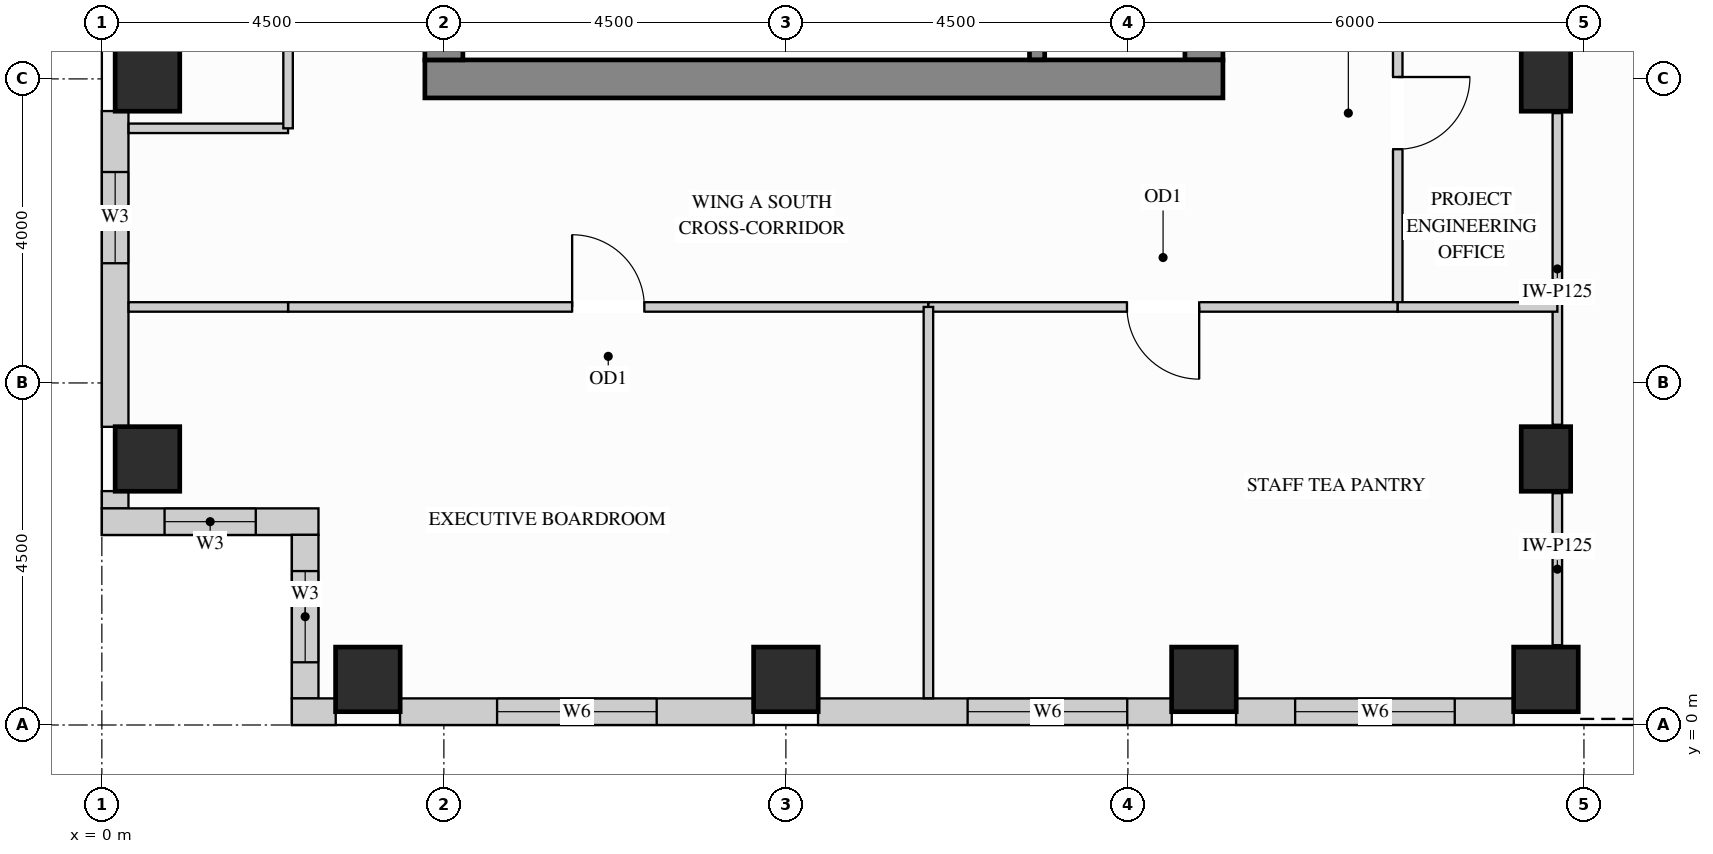
"""IFC4 building model, lengths in metres.
Left out: names, types, materials, properties, quantities, classifications, styles, units other than length and angle.
Written with IfcOpenShell. Run it as: python <this file> out.ifc"""

import sys

from ifc_helpers import new_model, si_unit, direction, frame, frame_2d, origin, origin_2d, place, context, subcontext, project, spatial, rectangle, extrude, source, transform, mapped, element, fill, save


model = new_model("IFC4")
c1 = context("Model", 3, precision=1e-05, world=origin(), true_north=direction((0.0, 1.0)))
c2 = subcontext(c1, "Body", "Model", "MODEL_VIEW")
j1 = project(units=[si_unit("LENGTHUNIT", "METRE"), si_unit("PLANEANGLEUNIT", "RADIAN")], contexts=[c1])
p1 = place(None, origin())
s1 = spatial("IfcSite", under=j1, at=p1, CompositionType="ELEMENT")
p2 = place(p1, origin())
s2 = spatial("IfcBuilding", under=s1, at=p2, CompositionType="ELEMENT")
p3 = place(p2, frame((0.0, 0.0, 259.2)))
s3 = spatial("IfcBuildingStorey", under=s2, at=p3, CompositionType="ELEMENT", Elevation=259.2)
m1 = source(origin(), c2, "Body", "SweptSolid", [
    extrude(rectangle(XDim=0.65, YDim=0.85, at=origin_2d()), origin(), (0.0, 0.0, 1.0), 3.4),
])
for number, where, z_axis, x_axis in (
    (1, (19.0, 3.5, 0.0), (0.0, 0.0, 1.0), (1.0, 0.0, 0.0)),
    (2, (19.0, 8.5, 0.0), (0.0, 0.0, 1.0), (1.0, 0.0, 0.0)),
):
    element("IfcColumn", number, at=place(p3, frame(where, z_axis=z_axis, x_axis=x_axis)), inside=s3, PredefinedType="COLUMN", context=c2, shape_type="MappedRepresentation", body=[
        mapped(m1, transform((0.0, 0.0, 0.0), x_axis=(1.0, 0.0, 0.0), y_axis=(0.0, 1.0, 0.0), z_axis=(0.0, 0.0, 1.0))),
    ])
m2 = source(origin(), c2, "Body", "SweptSolid", [
    extrude(rectangle(XDim=0.85, YDim=0.85, at=origin_2d()), origin(), (0.0, 0.0, 1.0), 3.4),
])
for number, where, z_axis, x_axis in (
    (3, (14.5, 0.6, 0.0), (0.0, 0.0, 1.0), (1.0, 0.0, 0.0)),
    (4, (19.0, 0.6, 0.0), (0.0, 0.0, 1.0), (1.0, 0.0, 0.0)),
    (5, (3.5, 0.6, 0.0), (0.0, 0.0, 1.0), (1.0, 0.0, 0.0)),
    (6, (9.0, 0.6, 0.0), (0.0, 0.0, 1.0), (1.0, 0.0, 0.0)),
    (7, (0.6, 3.5, 0.0), (0.0, 0.0, 1.0), (1.0, 0.0, 0.0)),
    (8, (0.6, 8.5, 0.0), (0.0, 0.0, 1.0), (1.0, 0.0, 0.0)),
):
    element("IfcColumn", number, at=place(p3, frame(where, z_axis=z_axis, x_axis=x_axis)), inside=s3, PredefinedType="COLUMN", context=c2, shape_type="MappedRepresentation", body=[
        mapped(m2, transform((0.0, 0.0, 0.0), x_axis=(1.0, 0.0, 0.0), y_axis=(0.0, 1.0, 0.0), z_axis=(0.0, 0.0, 1.0))),
    ])
m3 = source(origin(), c2, "Body", "SweptSolid", [
    extrude(rectangle(XDim=10.07, YDim=0.5, at=frame_2d((5.035, 0.0))), origin(), (0.0, 0.0, 1.0), 3.4),
])
p4 = place(p3, frame((14.5, 8.75, 0.0), z_axis=(0.0, 0.0, 1.0), x_axis=(0.0, 1.0, 0.0)))
e9 = element("IfcWall", 9, at=p4, inside=s3, PredefinedType="SHEAR", context=c2, shape_type="MappedRepresentation", body=[
    mapped(m3, transform((0.0, 0.0, 0.0), x_axis=(1.0, 0.0, 0.0), y_axis=(0.0, 1.0, 0.0), z_axis=(0.0, 0.0, 1.0))),
])
m4 = source(origin(), c2, "Body", "SweptSolid", [
    extrude(rectangle(XDim=10.5, YDim=0.5, at=frame_2d((5.25, 0.0))), origin(), (0.0, 0.0, 1.0), 3.4),
])
p5 = place(p3, frame((4.25, 8.5, 0.0), z_axis=(0.0, 0.0, 1.0), x_axis=(1.0, 0.0, 0.0)))
e10 = element("IfcWall", 10, at=p5, inside=s3, PredefinedType="SHEAR", context=c2, shape_type="MappedRepresentation", body=[
    mapped(m4, transform((0.0, 0.0, 0.0), x_axis=(1.0, 0.0, 0.0), y_axis=(0.0, 1.0, 0.0), z_axis=(0.0, 0.0, 1.0))),
])
m5 = source(origin(), c2, "Body", "SweptSolid", [
    extrude(rectangle(XDim=20.5, YDim=0.5, at=frame_2d((10.25, 0.0))), origin(), (0.0, 0.0, 1.0), 3.4),
])
p6 = place(p3, frame((4.5, 8.75, 0.0), z_axis=(0.0, 0.0, 1.0), x_axis=(0.0, 1.0, 0.0)))
e11 = element("IfcWall", 11, at=p6, inside=s3, PredefinedType="SHEAR", context=c2, shape_type="MappedRepresentation", body=[
    mapped(m5, transform((0.0, 0.0, 0.0), x_axis=(1.0, 0.0, 0.0), y_axis=(0.0, 1.0, 0.0), z_axis=(0.0, 0.0, 1.0))),
])
p7 = place(p3, frame((0.175, 8.077, 0.0), z_axis=(0.0, 0.0, 1.0), x_axis=(0.0, -1.0, 0.0)))
e12 = element("IfcWall", 12, at=p7, inside=s3, PredefinedType="SOLIDWALL", context=c2, shape_type="SweptSolid", body=[
    extrude(rectangle(XDim=4.154, YDim=0.35, at=frame_2d((2.077, 0.0))), origin(), (0.0, 0.0, 1.0), 3.385),
])
p8 = place(p7, frame((0.802, 0.0, 0.78)))
e13 = element("IfcOpeningElement", 13, at=p8, cuts=e12, PredefinedType="OPENING", context=c2, shape_type="SweptSolid", body=[
    extrude(rectangle(XDim=1.2, YDim=2.25, at=frame_2d((0.6, 1.125))), frame((0.0, 0.185, 0.0), z_axis=(0.0, -1.0, 0.0), x_axis=(1.0, 0.0, 0.0)), (0.0, 0.0, 1.0), 0.37),
])
m6 = source(origin(), c2, "Body", "SweptSolid", [
    extrude(rectangle(XDim=0.229, YDim=0.35, at=frame_2d((0.115, 0.0))), origin(), (0.0, 0.0, 1.0), 3.385),
])
p9 = place(p3, frame((0.175, 3.077, 0.0), z_axis=(0.0, 0.0, 1.0), x_axis=(0.0, -1.0, 0.0)))
e14 = element("IfcWall", 14, at=p9, inside=s3, PredefinedType="SOLIDWALL", context=c2, shape_type="MappedRepresentation", body=[
    mapped(m6, transform((0.0, 0.0, 0.0), x_axis=(1.0, 0.0, 0.0), y_axis=(0.0, 1.0, 0.0), z_axis=(0.0, 0.0, 1.0))),
])
p10 = place(p3, frame((0.0, 2.675, 0.0), z_axis=(0.0, 0.0, 1.0), x_axis=(1.0, 0.0, 0.0)))
e15 = element("IfcWall", 15, at=p10, inside=s3, PredefinedType="SOLIDWALL", context=c2, shape_type="SweptSolid", body=[
    extrude(rectangle(XDim=2.85, YDim=0.35, at=frame_2d((1.425, 0.0))), origin(), (0.0, 0.0, 1.0), 3.385),
])
p11 = place(p10, frame((0.825, 0.0, 0.78)))
e16 = element("IfcOpeningElement", 16, at=p11, cuts=e15, PredefinedType="OPENING", context=c2, shape_type="SweptSolid", body=[
    extrude(rectangle(XDim=1.2, YDim=2.25, at=frame_2d((0.6, 1.125))), frame((0.0, 0.185, 0.0), z_axis=(0.0, -1.0, 0.0), x_axis=(1.0, 0.0, 0.0)), (0.0, 0.0, 1.0), 0.37),
])
p12 = place(p3, frame((2.675, 2.502, 0.0), z_axis=(0.0, 0.0, 1.0), x_axis=(0.0, -1.0, 0.0)))
e17 = element("IfcWall", 17, at=p12, inside=s3, PredefinedType="SOLIDWALL", context=c2, shape_type="SweptSolid", body=[
    extrude(rectangle(XDim=2.154, YDim=0.35, at=frame_2d((1.077, 0.0))), origin(), (0.0, 0.0, 1.0), 3.385),
])
p13 = place(p12, frame((0.477, 0.0, 0.78)))
e18 = element("IfcOpeningElement", 18, at=p13, cuts=e17, PredefinedType="OPENING", context=c2, shape_type="SweptSolid", body=[
    extrude(rectangle(XDim=1.2, YDim=2.25, at=frame_2d((0.6, 1.125))), frame((0.0, 0.185, 0.0), z_axis=(0.0, -1.0, 0.0), x_axis=(1.0, 0.0, 0.0)), (0.0, 0.0, 1.0), 0.37),
])
m7 = source(origin(), c2, "Body", "SweptSolid", [
    extrude(rectangle(XDim=0.577, YDim=0.35, at=frame_2d((0.289, 0.0))), origin(), (0.0, 0.0, 1.0), 3.385),
])
p14 = place(p3, frame((2.5, 0.175, 0.0), z_axis=(0.0, 0.0, 1.0), x_axis=(1.0, 0.0, 0.0)))
e19 = element("IfcWall", 19, at=p14, inside=s3, PredefinedType="SOLIDWALL", context=c2, shape_type="MappedRepresentation", body=[
    mapped(m7, transform((0.0, 0.0, 0.0), x_axis=(1.0, 0.0, 0.0), y_axis=(0.0, 1.0, 0.0), z_axis=(0.0, 0.0, 1.0))),
])
p15 = place(p3, frame((3.923, 0.175, 0.0), z_axis=(0.0, 0.0, 1.0), x_axis=(1.0, 0.0, 0.0)))
e20 = element("IfcWall", 20, at=p15, inside=s3, PredefinedType="SOLIDWALL", context=c2, shape_type="SweptSolid", body=[
    extrude(rectangle(XDim=4.654, YDim=0.35, at=frame_2d((2.327, 0.0))), origin(), (0.0, 0.0, 1.0), 3.385),
])
p16 = place(p15, frame((1.277, 0.0, 0.78)))
e21 = element("IfcOpeningElement", 21, at=p16, cuts=e20, PredefinedType="OPENING", context=c2, shape_type="SweptSolid", body=[
    extrude(rectangle(XDim=2.1, YDim=2.25, at=frame_2d((1.05, 1.125))), frame((0.0, 0.185, 0.0), z_axis=(0.0, -1.0, 0.0), x_axis=(1.0, 0.0, 0.0)), (0.0, 0.0, 1.0), 0.37),
])
p17 = place(p3, frame((9.423, 0.175, 0.0), z_axis=(0.0, 0.0, 1.0), x_axis=(1.0, 0.0, 0.0)))
e22 = element("IfcWall", 22, at=p17, inside=s3, PredefinedType="SOLIDWALL", context=c2, shape_type="SweptSolid", body=[
    extrude(rectangle(XDim=4.654, YDim=0.35, at=frame_2d((2.327, 0.0))), origin(), (0.0, 0.0, 1.0), 3.385),
])
p18 = place(p17, frame((1.968, 0.0, 0.78)))
e23 = element("IfcOpeningElement", 23, at=p18, cuts=e22, PredefinedType="OPENING", context=c2, shape_type="SweptSolid", body=[
    extrude(rectangle(XDim=2.1, YDim=2.25, at=frame_2d((1.05, 1.125))), frame((0.0, 0.185, 0.0), z_axis=(0.0, -1.0, 0.0), x_axis=(1.0, 0.0, 0.0)), (0.0, 0.0, 1.0), 0.37),
])
p19 = place(p3, frame((14.923, 0.175, 0.0), z_axis=(0.0, 0.0, 1.0), x_axis=(1.0, 0.0, 0.0)))
e24 = element("IfcWall", 24, at=p19, inside=s3, PredefinedType="SOLIDWALL", context=c2, shape_type="SweptSolid", body=[
    extrude(rectangle(XDim=3.654, YDim=0.35, at=frame_2d((1.827, 0.0))), origin(), (0.0, 0.0, 1.0), 3.385),
])
p20 = place(p19, frame((0.777, 0.0, 0.78)))
e25 = element("IfcOpeningElement", 25, at=p20, cuts=e24, PredefinedType="OPENING", context=c2, shape_type="SweptSolid", body=[
    extrude(rectangle(XDim=2.1, YDim=2.25, at=frame_2d((1.05, 1.125))), frame((0.0, 0.185, 0.0), z_axis=(0.0, -1.0, 0.0), x_axis=(1.0, 0.0, 0.0)), (0.0, 0.0, 1.0), 0.37),
])
m8 = source(origin(), c2, "Body", "SweptSolid", [
    extrude(rectangle(XDim=2.0, YDim=0.125, at=frame_2d((1.0, 0.0))), origin(), (0.0, 0.0, 1.0), 2.773),
])
p21 = place(p3, frame((19.15, 1.05, 0.0), z_axis=(0.0, 0.0, 1.0), x_axis=(0.0, 1.0, 0.0)))
e26 = element("IfcWall", 26, at=p21, inside=s3, PredefinedType="PARTITIONING", context=c2, shape_type="MappedRepresentation", body=[
    mapped(m8, transform((0.0, 0.0, 0.0), x_axis=(1.0, 0.0, 0.0), y_axis=(0.0, 1.0, 0.0), z_axis=(0.0, 0.0, 1.0))),
])
m9 = source(origin(), c2, "Body", "SweptSolid", [
    extrude(rectangle(XDim=4.1, YDim=0.125, at=frame_2d((2.05, 0.0))), origin(), (0.0, 0.0, 1.0), 2.773),
])
p22 = place(p3, frame((19.15, 3.95, 0.0), z_axis=(0.0, 0.0, 1.0), x_axis=(0.0, 1.0, 0.0)))
e27 = element("IfcWall", 27, at=p22, inside=s3, PredefinedType="PARTITIONING", context=c2, shape_type="MappedRepresentation", body=[
    mapped(m9, transform((0.0, 0.0, 0.0), x_axis=(1.0, 0.0, 0.0), y_axis=(0.0, 1.0, 0.0), z_axis=(0.0, 0.0, 1.0))),
])
p23 = place(p3, frame((17.05, 5.5, 0.0), z_axis=(0.0, 0.0, 1.0), x_axis=(0.0, 1.0, 0.0)))
e28 = element("IfcWall", 28, at=p23, inside=s3, PredefinedType="PARTITIONING", context=c2, shape_type="SweptSolid", body=[
    extrude(rectangle(XDim=5.1, YDim=0.125, at=frame_2d((2.55, 0.0))), origin(), (0.0, 0.0, 1.0), 3.385),
])
p24 = place(p23, frame((2.075, 0.0, 0.0)))
e29 = element("IfcOpeningElement", 29, at=p24, cuts=e28, PredefinedType="OPENING", context=c2, shape_type="SweptSolid", body=[
    extrude(rectangle(XDim=0.95, YDim=2.15, at=frame_2d((0.475, 1.075))), frame((0.0, 0.073, 0.0), z_axis=(0.0, -1.0, 0.0), x_axis=(1.0, 0.0, 0.0)), (0.0, 0.0, 1.0), 0.145),
])
m10 = source(origin(), c2, "Body", "SweptSolid", [
    extrude(rectangle(XDim=2.098, YDim=0.125, at=frame_2d((1.049, 0.0))), origin(), (0.0, 0.0, 1.0), 3.385),
])
p25 = place(p3, frame((0.352, 7.85, 0.0), z_axis=(0.0, 0.0, 1.0), x_axis=(1.0, 0.0, 0.0)))
e30 = element("IfcWall", 30, at=p25, inside=s3, PredefinedType="PARTITIONING", context=c2, shape_type="MappedRepresentation", body=[
    mapped(m10, transform((0.0, 0.0, 0.0), x_axis=(1.0, 0.0, 0.0), y_axis=(0.0, 1.0, 0.0), z_axis=(0.0, 0.0, 1.0))),
])
p26 = place(p3, frame((2.45, 5.5, 0.0), z_axis=(0.0, 0.0, 1.0), x_axis=(1.0, 0.0, 0.0)))
e31 = element("IfcWall", 31, at=p26, inside=s3, PredefinedType="PARTITIONING", context=c2, shape_type="SweptSolid", body=[
    extrude(rectangle(XDim=8.425, YDim=0.125, at=frame_2d((4.212, 0.0))), origin(), (0.0, 0.0, 1.0), 3.385),
])
p27 = place(p26, frame((3.738, 0.0, 0.0)))
e32 = element("IfcOpeningElement", 32, at=p27, cuts=e31, PredefinedType="OPENING", context=c2, shape_type="SweptSolid", body=[
    extrude(rectangle(XDim=0.95, YDim=2.15, at=frame_2d((0.475, 1.075))), frame((0.0, 0.073, 0.0), z_axis=(0.0, -1.0, 0.0), x_axis=(1.0, 0.0, 0.0)), (0.0, 0.0, 1.0), 0.145),
])
p28 = place(p3, frame((10.875, 5.5, 0.0), z_axis=(0.0, 0.0, 1.0), x_axis=(1.0, 0.0, 0.0)))
e33 = element("IfcWall", 33, at=p28, inside=s3, PredefinedType="PARTITIONING", context=c2, shape_type="SweptSolid", body=[
    extrude(rectangle(XDim=6.175, YDim=0.125, at=frame_2d((3.087, 0.0))), origin(), (0.0, 0.0, 1.0), 3.385),
])
p29 = place(p28, frame((2.613, 0.0, 0.0)))
e34 = element("IfcOpeningElement", 34, at=p29, cuts=e33, PredefinedType="OPENING", context=c2, shape_type="SweptSolid", body=[
    extrude(rectangle(XDim=0.95, YDim=2.15, at=frame_2d((0.475, 1.075))), frame((0.0, 0.073, 0.0), z_axis=(0.0, -1.0, 0.0), x_axis=(1.0, 0.0, 0.0)), (0.0, 0.0, 1.0), 0.145),
])
p30 = place(p3, frame((0.352, 5.5, 0.0), z_axis=(0.0, 0.0, 1.0), x_axis=(1.0, 0.0, 0.0)))
e35 = element("IfcWall", 35, at=p30, inside=s3, PredefinedType="PARTITIONING", context=c2, shape_type="MappedRepresentation", body=[
    mapped(m10, transform((0.0, 0.0, 0.0), x_axis=(1.0, 0.0, 0.0), y_axis=(0.0, 1.0, 0.0), z_axis=(0.0, 0.0, 1.0))),
])
m11 = source(origin(), c2, "Body", "SweptSolid", [
    extrude(rectangle(XDim=2.1, YDim=0.125, at=frame_2d((1.05, 0.0))), origin(), (0.0, 0.0, 1.0), 3.385),
])
p31 = place(p3, frame((17.05, 5.5, 0.0), z_axis=(0.0, 0.0, 1.0), x_axis=(1.0, 0.0, 0.0)))
e36 = element("IfcWall", 36, at=p31, inside=s3, PredefinedType="PARTITIONING", context=c2, shape_type="MappedRepresentation", body=[
    mapped(m11, transform((0.0, 0.0, 0.0), x_axis=(1.0, 0.0, 0.0), y_axis=(0.0, 1.0, 0.0), z_axis=(0.0, 0.0, 1.0))),
])
m12 = source(origin(), c2, "Body", "SweptSolid", [
    extrude(rectangle(XDim=5.148, YDim=0.125, at=frame_2d((2.574, 0.0))), origin(), (0.0, 0.0, 1.0), 3.385),
])
p32 = place(p3, frame((10.875, 0.352, 0.0), z_axis=(0.0, 0.0, 1.0), x_axis=(0.0, 1.0, 0.0)))
e37 = element("IfcWall", 37, at=p32, inside=s3, PredefinedType="PARTITIONING", context=c2, shape_type="MappedRepresentation", body=[
    mapped(m12, transform((0.0, 0.0, 0.0), x_axis=(1.0, 0.0, 0.0), y_axis=(0.0, 1.0, 0.0), z_axis=(0.0, 0.0, 1.0))),
])
p33 = place(p3, frame((2.45, 7.85, 0.0), z_axis=(0.0, 0.0, 1.0), x_axis=(0.0, 1.0, 0.0)))
e38 = element("IfcWall", 38, at=p33, inside=s3, PredefinedType="PARTITIONING", context=c2, shape_type="SweptSolid", body=[
    extrude(rectangle(XDim=7.25, YDim=0.125, at=frame_2d((3.625, 0.0))), origin(), (0.0, 0.0, 1.0), 3.385),
])
p34 = place(p33, frame((3.15, 0.0, 0.0)))
e39 = element("IfcOpeningElement", 39, at=p34, cuts=e38, PredefinedType="OPENING", context=c2, shape_type="SweptSolid", body=[
    extrude(rectangle(XDim=0.95, YDim=2.15, at=frame_2d((0.475, 1.075))), frame((0.0, 0.073, 0.0), z_axis=(0.0, -1.0, 0.0), x_axis=(1.0, 0.0, 0.0)), (0.0, 0.0, 1.0), 0.145),
])
m13 = source(origin(), c2, "Body", "SweptSolid", [
    extrude(rectangle(XDim=3.803, YDim=0.2, at=frame_2d((1.901, 0.0))), origin(), (0.0, 0.0, 1.0), 3.4),
])
p35 = place(p3, frame((12.305, 8.752, 0.0), z_axis=(0.0, 0.0, 1.0), x_axis=(0.0, 1.0, 0.0)))
e40 = element("IfcWall", 40, at=p35, inside=s3, PredefinedType="SHEAR", context=c2, shape_type="MappedRepresentation", body=[
    mapped(m13, transform((0.0, 0.0, 0.0), x_axis=(1.0, 0.0, 0.0), y_axis=(0.0, 1.0, 0.0), z_axis=(0.0, 0.0, 1.0))),
])
m14 = source(origin(), c2, "Body", "SweptSolid", [
    extrude(rectangle(XDim=0.95, YDim=2.15, at=frame_2d((0.475, 1.075))), frame((0.0, 0.025, 0.0), z_axis=(0.0, -1.0, 0.0), x_axis=(1.0, 0.0, 0.0)), (0.0, 0.0, 1.0), 0.05),
])
p36 = place(p24, origin())
e41 = element("IfcDoor", 41, at=p36, inside=s3, OperationType="SINGLE_SWING_RIGHT", PredefinedType="DOOR", context=c2, shape_type="MappedRepresentation", body=[
    mapped(m14, transform((0.0, 0.0, 0.0), x_axis=(1.0, 0.0, 0.0), y_axis=(0.0, 1.0, 0.0), z_axis=(0.0, 0.0, 1.0))),
])
fill(e29, e41)
p37 = place(p27, origin())
e42 = element("IfcDoor", 42, at=p37, inside=s3, OperationType="SINGLE_SWING_LEFT", PredefinedType="DOOR", context=c2, shape_type="MappedRepresentation", body=[
    mapped(m14, transform((0.0, 0.0, 0.0), x_axis=(1.0, 0.0, 0.0), y_axis=(0.0, 1.0, 0.0), z_axis=(0.0, 0.0, 1.0))),
])
fill(e32, e42)
p38 = place(p29, origin())
e43 = element("IfcDoor", 43, at=p38, inside=s3, OperationType="SINGLE_SWING_RIGHT", PredefinedType="DOOR", context=c2, shape_type="MappedRepresentation", body=[
    mapped(m14, transform((0.0, 0.0, 0.0), x_axis=(1.0, 0.0, 0.0), y_axis=(0.0, 1.0, 0.0), z_axis=(0.0, 0.0, 1.0))),
])
fill(e34, e43)
m15 = source(origin(), c2, "Body", "SweptSolid", [
    extrude(rectangle(XDim=1.2, YDim=2.25, at=frame_2d((0.6, 1.125))), frame((0.0, 0.03, 0.0), z_axis=(0.0, -1.0, 0.0), x_axis=(1.0, 0.0, 0.0)), (0.0, 0.0, 1.0), 0.06),
])
p39 = place(p8, origin())
e44 = element("IfcWindow", 44, at=p39, inside=s3, PartitioningType="SINGLE_PANEL", PredefinedType="WINDOW", context=c2, shape_type="MappedRepresentation", body=[
    mapped(m15, transform((0.0, 0.0, 0.0), x_axis=(1.0, 0.0, 0.0), y_axis=(0.0, 1.0, 0.0), z_axis=(0.0, 0.0, 1.0))),
])
fill(e13, e44)
p40 = place(p11, origin())
e45 = element("IfcWindow", 45, at=p40, inside=s3, PartitioningType="SINGLE_PANEL", PredefinedType="WINDOW", context=c2, shape_type="MappedRepresentation", body=[
    mapped(m15, transform((0.0, 0.0, 0.0), x_axis=(1.0, 0.0, 0.0), y_axis=(0.0, 1.0, 0.0), z_axis=(0.0, 0.0, 1.0))),
])
fill(e16, e45)
p41 = place(p13, origin())
e46 = element("IfcWindow", 46, at=p41, inside=s3, PartitioningType="SINGLE_PANEL", PredefinedType="WINDOW", context=c2, shape_type="MappedRepresentation", body=[
    mapped(m15, transform((0.0, 0.0, 0.0), x_axis=(1.0, 0.0, 0.0), y_axis=(0.0, 1.0, 0.0), z_axis=(0.0, 0.0, 1.0))),
])
fill(e18, e46)
m16 = source(origin(), c2, "Body", "SweptSolid", [
    extrude(rectangle(XDim=2.1, YDim=2.25, at=frame_2d((1.05, 1.125))), frame((0.0, 0.03, 0.0), z_axis=(0.0, -1.0, 0.0), x_axis=(1.0, 0.0, 0.0)), (0.0, 0.0, 1.0), 0.06),
])
p42 = place(p16, origin())
e47 = element("IfcWindow", 47, at=p42, inside=s3, PartitioningType="SINGLE_PANEL", PredefinedType="WINDOW", context=c2, shape_type="MappedRepresentation", body=[
    mapped(m16, transform((0.0, 0.0, 0.0), x_axis=(1.0, 0.0, 0.0), y_axis=(0.0, 1.0, 0.0), z_axis=(0.0, 0.0, 1.0))),
])
fill(e21, e47)
p43 = place(p18, origin())
e48 = element("IfcWindow", 48, at=p43, inside=s3, PartitioningType="SINGLE_PANEL", PredefinedType="WINDOW", context=c2, shape_type="MappedRepresentation", body=[
    mapped(m16, transform((0.0, 0.0, 0.0), x_axis=(1.0, 0.0, 0.0), y_axis=(0.0, 1.0, 0.0), z_axis=(0.0, 0.0, 1.0))),
])
fill(e23, e48)
p44 = place(p20, origin())
e49 = element("IfcWindow", 49, at=p44, inside=s3, PartitioningType="SINGLE_PANEL", PredefinedType="WINDOW", context=c2, shape_type="MappedRepresentation", body=[
    mapped(m16, transform((0.0, 0.0, 0.0), x_axis=(1.0, 0.0, 0.0), y_axis=(0.0, 1.0, 0.0), z_axis=(0.0, 0.0, 1.0))),
])
fill(e25, e49)
save(model, sys.argv[1])
